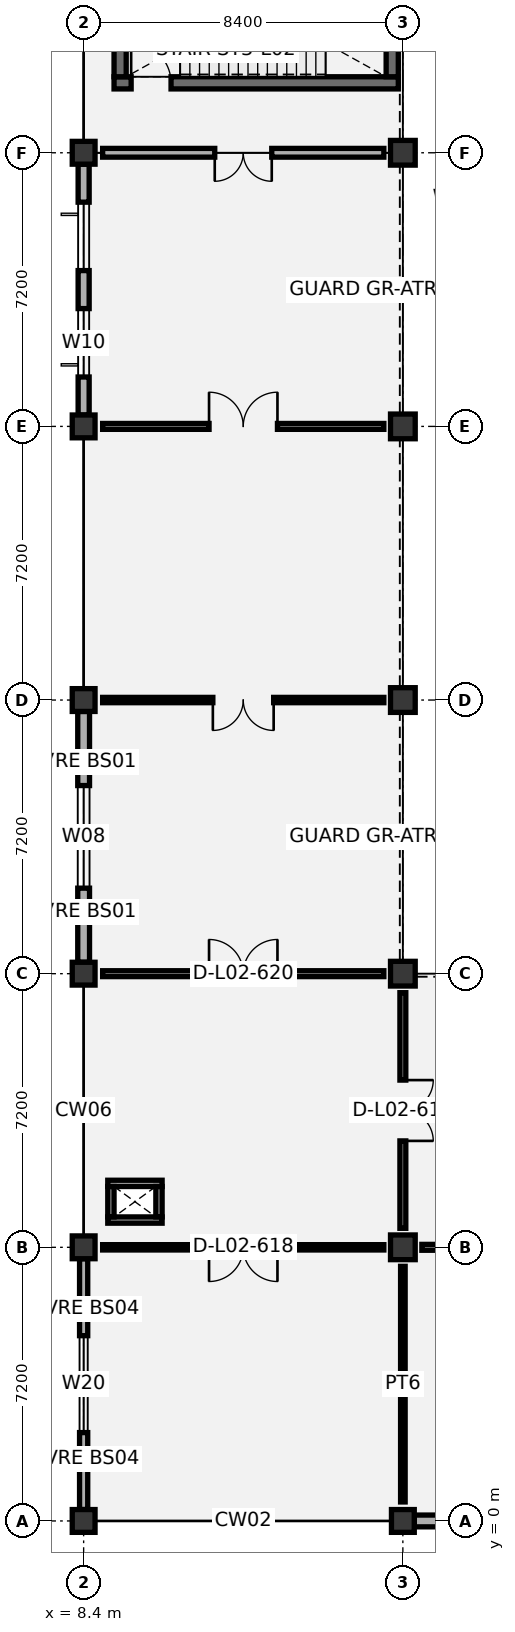
"""IFC4 building model, lengths in metres.
Left out: names, types, materials, properties, quantities, classifications, styles, units other than length and angle.
Written with IfcOpenShell. Run it as: python <this file> out.ifc"""

import sys

from ifc_helpers import new_model, si_unit, direction, frame, frame_2d, origin, origin_2d, place, context, subcontext, project, spatial, rectangle, extrude, element, fill, save


model = new_model("IFC4")
c1 = context("Model", 3, precision=1e-05, world=origin(), true_north=direction((0.0, 1.0)))
c2 = subcontext(c1, "Body", "Model", "MODEL_VIEW")
j1 = project(units=[si_unit("LENGTHUNIT", "METRE"), si_unit("PLANEANGLEUNIT", "RADIAN")], contexts=[c1])
p1 = place(None, origin())
s1 = spatial("IfcSite", under=j1, at=p1, CompositionType="ELEMENT")
p2 = place(p1, origin())
s2 = spatial("IfcBuilding", under=s1, at=p2, CompositionType="ELEMENT")
p3 = place(p2, frame((0.0, 0.0, 11.4)))
s3 = spatial("IfcBuildingStorey", under=s2, at=p3, CompositionType="ELEMENT", Elevation=11.4)
for number, where, z_axis, x_axis in (
    (1, (8.4, 0.0, 0.0), (0.0, 0.0, 1.0), (1.0, 0.0, 0.0)),
    (2, (8.4, 7.2, 0.0), (0.0, 0.0, 1.0), (1.0, 0.0, 0.0)),
    (3, (8.4, 14.4, 0.0), (0.0, 0.0, 1.0), (1.0, 0.0, 0.0)),
    (4, (8.4, 21.6, 0.0), (0.0, 0.0, 1.0), (1.0, 0.0, 0.0)),
    (5, (8.4, 28.8, 0.0), (0.0, 0.0, 1.0), (1.0, 0.0, 0.0)),
    (6, (8.4, 36.0, 0.0), (0.0, 0.0, 1.0), (1.0, 0.0, 0.0)),
    (7, (16.8, 0.0, 0.0), (0.0, 0.0, 1.0), (1.0, 0.0, 0.0)),
):
    element("IfcColumn", number, at=place(p3, frame(where, z_axis=z_axis, x_axis=x_axis)), inside=s3, PredefinedType="COLUMN", context=c2, shape_type="SweptSolid", body=[
        extrude(rectangle(XDim=0.6, YDim=0.6, at=origin_2d()), origin(), (0.0, 0.0, 1.0), 5.4),
    ])
for number, where, z_axis, x_axis in (
    (8, (16.8, 7.2, 0.0), (0.0, 0.0, 1.0), (1.0, 0.0, 0.0)),
    (9, (16.8, 14.4, 0.0), (0.0, 0.0, 1.0), (1.0, 0.0, 0.0)),
    (10, (16.8, 21.6, 0.0), (0.0, 0.0, 1.0), (1.0, 0.0, 0.0)),
    (11, (16.8, 28.8, 0.0), (0.0, 0.0, 1.0), (1.0, 0.0, 0.0)),
    (12, (16.8, 36.0, 0.0), (0.0, 0.0, 1.0), (1.0, 0.0, 0.0)),
):
    element("IfcColumn", number, at=place(p3, frame(where, z_axis=z_axis, x_axis=x_axis)), inside=s3, PredefinedType="COLUMN", context=c2, shape_type="SweptSolid", body=[
        extrude(rectangle(XDim=0.65, YDim=0.65, at=origin_2d()), origin(), (0.0, 0.0, 1.0), 5.4),
    ])
p4 = place(p3, frame((9.2, 37.84, 0.0), z_axis=(0.0, 0.0, 1.0), x_axis=(1.0, 0.0, 0.0)))
e13 = element("IfcWall", 13, at=p4, inside=s3, PredefinedType="SHEAR", context=c2, shape_type="SweptSolid", body=[
    extrude(rectangle(XDim=7.48, YDim=0.32, at=frame_2d((3.74, 0.0))), origin(), (0.0, 0.0, 1.0), 5.1),
])
p5 = place(p4, frame((0.45, 0.0, 0.0)))
e14 = element("IfcOpeningElement", 14, at=p5, cuts=e13, PredefinedType="OPENING", context=c2, shape_type="SweptSolid", body=[
    extrude(rectangle(XDim=1.05, YDim=2.15, at=frame_2d((0.525, 1.075))), frame((0.0, 0.17, 0.0), z_axis=(0.0, -1.0, 0.0), x_axis=(1.0, 0.0, 0.0)), (0.0, 0.0, 1.0), 0.34),
])
for number, where, z_axis, x_axis in (
    (15, (9.36, 38.0, 0.0), (0.0, 0.0, 1.0), (0.0, 1.0, 0.0)),
    (16, (16.52, 38.0, 0.0), (0.0, 0.0, 1.0), (0.0, 1.0, 0.0)),
):
    element("IfcWall", number, at=place(p3, frame(where, z_axis=z_axis, x_axis=x_axis)), inside=s3, PredefinedType="SHEAR", context=c2, shape_type="SweptSolid", body=[
        extrude(rectangle(XDim=3.8, YDim=0.32, at=frame_2d((1.9, 0.0))), origin(), (0.0, 0.0, 1.0), 5.1),
    ])
p6 = place(p3, frame((8.4, 0.3, 0.0), z_axis=(0.0, 0.0, 1.0), x_axis=(0.0, 1.0, 0.0)))
e17 = element("IfcWall", 17, at=p6, inside=s3, PredefinedType="SOLIDWALL", context=c2, shape_type="SweptSolid", body=[
    extrude(rectangle(XDim=6.6, YDim=0.215, at=frame_2d((3.3, 0.0))), origin(), (0.0, 0.0, 1.0), 4.52),
])
p7 = place(p6, frame((2.025, 0.0, 0.9)))
e18 = element("IfcOpeningElement", 18, at=p7, cuts=e17, PredefinedType="OPENING", context=c2, shape_type="SweptSolid", body=[
    extrude(rectangle(XDim=2.55, YDim=1.95, at=frame_2d((1.275, 0.975))), frame((0.0, 0.117, 0.0), z_axis=(0.0, -1.0, 0.0), x_axis=(1.0, 0.0, 0.0)), (0.0, 0.0, 1.0), 0.235),
])
p8 = place(p3, frame((8.4, 14.7, 0.0), z_axis=(0.0, 0.0, 1.0), x_axis=(0.0, 1.0, 0.0)))
e19 = element("IfcWall", 19, at=p8, inside=s3, PredefinedType="SOLIDWALL", context=c2, shape_type="SweptSolid", body=[
    extrude(rectangle(XDim=6.6, YDim=0.31, at=frame_2d((3.3, 0.0))), origin(), (0.0, 0.0, 1.0), 4.445),
])
p9 = place(p8, frame((1.95, 0.0, 0.9)))
e20 = element("IfcOpeningElement", 20, at=p9, cuts=e19, PredefinedType="OPENING", context=c2, shape_type="SweptSolid", body=[
    extrude(rectangle(XDim=2.7, YDim=2.1, at=frame_2d((1.35, 1.05))), frame((0.0, 0.165, 0.0), z_axis=(0.0, -1.0, 0.0), x_axis=(1.0, 0.0, 0.0)), (0.0, 0.0, 1.0), 0.33),
])
p10 = place(p3, frame((8.4, 29.1, 0.0), z_axis=(0.0, 0.0, 1.0), x_axis=(0.0, 1.0, 0.0)))
e21 = element("IfcWall", 21, at=p10, inside=s3, PredefinedType="SOLIDWALL", context=c2, shape_type="SweptSolid", body=[
    extrude(rectangle(XDim=6.6, YDim=0.29, at=frame_2d((3.3, 0.0))), origin(), (0.0, 0.0, 1.0), 4.445),
])
p11 = place(p10, frame((1.0, 0.0, 0.9)))
e22 = element("IfcOpeningElement", 22, at=p11, cuts=e21, PredefinedType="OPENING", context=c2, shape_type="SweptSolid", body=[
    extrude(rectangle(XDim=1.8, YDim=2.1, at=frame_2d((0.9, 1.05))), frame((0.0, 0.155, 0.0), z_axis=(0.0, -1.0, 0.0), x_axis=(1.0, 0.0, 0.0)), (0.0, 0.0, 1.0), 0.31),
])
p12 = place(p10, frame((3.8, 0.0, 0.9)))
e23 = element("IfcOpeningElement", 23, at=p12, cuts=e21, PredefinedType="OPENING", context=c2, shape_type="SweptSolid", body=[
    extrude(rectangle(XDim=1.8, YDim=2.1, at=frame_2d((0.9, 1.05))), frame((0.0, 0.155, 0.0), z_axis=(0.0, -1.0, 0.0), x_axis=(1.0, 0.0, 0.0)), (0.0, 0.0, 1.0), 0.31),
])
p13 = place(p3, frame((17.1, 0.0, 0.0), z_axis=(0.0, 0.0, 1.0), x_axis=(1.0, 0.0, 0.0)))
e24 = element("IfcWall", 24, at=p13, inside=s3, PredefinedType="SOLIDWALL", context=c2, shape_type="SweptSolid", body=[
    extrude(rectangle(XDim=7.8, YDim=0.31, at=frame_2d((3.9, 0.0))), origin(), (0.0, 0.0, 1.0), 4.52),
])
p14 = place(p13, frame((1.0, 0.0, 0.9)))
e25 = element("IfcOpeningElement", 25, at=p14, cuts=e24, PredefinedType="OPENING", context=c2, shape_type="SweptSolid", body=[
    extrude(rectangle(XDim=2.4, YDim=2.1, at=frame_2d((1.2, 1.05))), frame((0.0, 0.165, 0.0), z_axis=(0.0, -1.0, 0.0), x_axis=(1.0, 0.0, 0.0)), (0.0, 0.0, 1.0), 0.33),
])
p15 = place(p13, frame((4.4, 0.0, 0.9)))
e26 = element("IfcOpeningElement", 26, at=p15, cuts=e24, PredefinedType="OPENING", context=c2, shape_type="SweptSolid", body=[
    extrude(rectangle(XDim=2.4, YDim=2.1, at=frame_2d((1.2, 1.05))), frame((0.0, 0.165, 0.0), z_axis=(0.0, -1.0, 0.0), x_axis=(1.0, 0.0, 0.0)), (0.0, 0.0, 1.0), 0.33),
])
p16 = place(p3, frame((0.12, 14.4, 0.0), z_axis=(0.0, 0.0, 1.0), x_axis=(1.0, 0.0, 0.0)))
e27 = element("IfcWall", 27, at=p16, inside=s3, PredefinedType="PARAPET", context=c2, shape_type="SweptSolid", body=[
    extrude(rectangle(XDim=8.16, YDim=0.22, at=frame_2d((4.08, 0.0))), origin(), (0.0, 0.0, 1.0), 1.15),
])
for number, where, z_axis, x_axis in (
    (28, (9.035, 7.917, 0.0), (0.0, 0.0, 1.0), (1.0, 0.0, 0.0)),
    (29, (9.035, 8.883, 0.0), (0.0, 0.0, 1.0), (1.0, 0.0, 0.0)),
):
    element("IfcWall", number, at=place(p3, frame(where, z_axis=z_axis, x_axis=x_axis)), inside=s3, PredefinedType="PARTITIONING", context=c2, shape_type="SweptSolid", body=[
        extrude(rectangle(XDim=1.43, YDim=0.165, at=frame_2d((0.715, 0.0))), origin(), (0.0, 0.0, 1.0), 5.1),
    ])
for number, where, z_axis, x_axis in (
    (30, (9.117, 8.0, 0.0), (0.0, 0.0, 1.0), (0.0, 1.0, 0.0)),
    (31, (10.383, 8.0, 0.0), (0.0, 0.0, 1.0), (0.0, 1.0, 0.0)),
):
    element("IfcWall", number, at=place(p3, frame(where, z_axis=z_axis, x_axis=x_axis)), inside=s3, PredefinedType="PARTITIONING", context=c2, shape_type="SweptSolid", body=[
        extrude(rectangle(XDim=0.8, YDim=0.165, at=frame_2d((0.4, 0.0))), origin(), (0.0, 0.0, 1.0), 5.1),
    ])
p17 = place(p3, frame((16.8, 0.5, 0.0), z_axis=(0.0, 0.0, 1.0), x_axis=(0.0, 1.0, 0.0)))
e32 = element("IfcWall", 32, at=p17, inside=s3, PredefinedType="PARTITIONING", context=c2, shape_type="SweptSolid", body=[
    extrude(rectangle(XDim=6.2, YDim=0.12, at=frame_2d((3.1, 0.0))), origin(), (0.0, 0.0, 1.0), 4.67),
])
p18 = place(p3, frame((8.9, 7.2, 0.0), z_axis=(0.0, 0.0, 1.0), x_axis=(1.0, 0.0, 0.0)))
e33 = element("IfcWall", 33, at=p18, inside=s3, PredefinedType="PARTITIONING", context=c2, shape_type="SweptSolid", body=[
    extrude(rectangle(XDim=7.4, YDim=0.14, at=frame_2d((3.7, 0.0))), origin(), (0.0, 0.0, 1.0), 4.345),
])
p19 = place(p18, frame((2.8, 0.0, 0.0)))
e34 = element("IfcOpeningElement", 34, at=p19, cuts=e33, PredefinedType="OPENING", context=c2, shape_type="SweptSolid", body=[
    extrude(rectangle(XDim=1.8, YDim=2.25, at=frame_2d((0.9, 1.125))), frame((0.0, 0.08, 0.0), z_axis=(0.0, -1.0, 0.0), x_axis=(1.0, 0.0, 0.0)), (0.0, 0.0, 1.0), 0.16),
])
p20 = place(p3, frame((16.8, 7.7, 0.0), z_axis=(0.0, 0.0, 1.0), x_axis=(0.0, 1.0, 0.0)))
e35 = element("IfcWall", 35, at=p20, inside=s3, PredefinedType="PARTITIONING", context=c2, shape_type="SweptSolid", body=[
    extrude(rectangle(XDim=6.2, YDim=0.155, at=frame_2d((3.1, 0.0))), origin(), (0.0, 0.0, 1.0), 4.395),
])
p21 = place(p20, frame((2.3, 0.0, 0.0)))
e36 = element("IfcOpeningElement", 36, at=p21, cuts=e35, PredefinedType="OPENING", context=c2, shape_type="SweptSolid", body=[
    extrude(rectangle(XDim=1.6, YDim=2.2, at=frame_2d((0.8, 1.1))), frame((0.0, 0.087, 0.0), z_axis=(0.0, -1.0, 0.0), x_axis=(1.0, 0.0, 0.0)), (0.0, 0.0, 1.0), 0.175),
])
p22 = place(p3, frame((8.9, 14.4, 0.0), z_axis=(0.0, 0.0, 1.0), x_axis=(1.0, 0.0, 0.0)))
e37 = element("IfcWall", 37, at=p22, inside=s3, PredefinedType="PARTITIONING", context=c2, shape_type="SweptSolid", body=[
    extrude(rectangle(XDim=7.4, YDim=0.155, at=frame_2d((3.7, 0.0))), origin(), (0.0, 0.0, 1.0), 4.345),
])
p23 = place(p22, frame((2.8, 0.0, 0.0)))
e38 = element("IfcOpeningElement", 38, at=p23, cuts=e37, PredefinedType="OPENING", context=c2, shape_type="SweptSolid", body=[
    extrude(rectangle(XDim=1.8, YDim=2.25, at=frame_2d((0.9, 1.125))), frame((0.0, 0.087, 0.0), z_axis=(0.0, -1.0, 0.0), x_axis=(1.0, 0.0, 0.0)), (0.0, 0.0, 1.0), 0.175),
])
p24 = place(p3, frame((8.9, 21.6, 0.0), z_axis=(0.0, 0.0, 1.0), x_axis=(1.0, 0.0, 0.0)))
e39 = element("IfcWall", 39, at=p24, inside=s3, PredefinedType="PARTITIONING", context=c2, shape_type="SweptSolid", body=[
    extrude(rectangle(XDim=7.4, YDim=0.14, at=frame_2d((3.7, 0.0))), origin(), (0.0, 0.0, 1.0), 4.345),
])
p25 = place(p24, frame((2.9, 0.0, 0.0)))
e40 = element("IfcOpeningElement", 40, at=p25, cuts=e39, PredefinedType="OPENING", context=c2, shape_type="SweptSolid", body=[
    extrude(rectangle(XDim=1.6, YDim=2.2, at=frame_2d((0.8, 1.1))), frame((0.0, 0.08, 0.0), z_axis=(0.0, -1.0, 0.0), x_axis=(1.0, 0.0, 0.0)), (0.0, 0.0, 1.0), 0.16),
])
p26 = place(p3, frame((8.9, 28.8, 0.0), z_axis=(0.0, 0.0, 1.0), x_axis=(1.0, 0.0, 0.0)))
e41 = element("IfcWall", 41, at=p26, inside=s3, PredefinedType="PARTITIONING", context=c2, shape_type="SweptSolid", body=[
    extrude(rectangle(XDim=7.4, YDim=0.155, at=frame_2d((3.7, 0.0))), origin(), (0.0, 0.0, 1.0), 4.345),
])
p27 = place(p26, frame((2.8, 0.0, 0.0)))
e42 = element("IfcOpeningElement", 42, at=p27, cuts=e41, PredefinedType="OPENING", context=c2, shape_type="SweptSolid", body=[
    extrude(rectangle(XDim=1.8, YDim=2.25, at=frame_2d((0.9, 1.125))), frame((0.0, 0.087, 0.0), z_axis=(0.0, -1.0, 0.0), x_axis=(1.0, 0.0, 0.0)), (0.0, 0.0, 1.0), 0.175),
])
p28 = place(p3, frame((8.9, 36.0, 0.0), z_axis=(0.0, 0.0, 1.0), x_axis=(1.0, 0.0, 0.0)))
e43 = element("IfcWall", 43, at=p28, inside=s3, PredefinedType="PARTITIONING", context=c2, shape_type="SweptSolid", body=[
    extrude(rectangle(XDim=7.4, YDim=0.23, at=frame_2d((3.7, 0.0))), origin(), (0.0, 0.0, 1.0), 4.345),
])
p29 = place(p28, frame((2.95, 0.0, 0.0)))
e44 = element("IfcOpeningElement", 44, at=p29, cuts=e43, PredefinedType="OPENING", context=c2, shape_type="SweptSolid", body=[
    extrude(rectangle(XDim=1.5, YDim=2.15, at=frame_2d((0.75, 1.075))), frame((0.0, 0.125, 0.0), z_axis=(0.0, -1.0, 0.0), x_axis=(1.0, 0.0, 0.0)), (0.0, 0.0, 1.0), 0.25),
])
p30 = place(p3, frame((17.3, 7.2, 0.0), z_axis=(0.0, 0.0, 1.0), x_axis=(1.0, 0.0, 0.0)))
e45 = element("IfcWall", 45, at=p30, inside=s3, PredefinedType="PARTITIONING", context=c2, shape_type="SweptSolid", body=[
    extrude(rectangle(XDim=7.4, YDim=0.155, at=frame_2d((3.7, 0.0))), origin(), (0.0, 0.0, 1.0), 4.345),
])
p31 = place(p30, frame((2.8, 0.0, 0.0)))
e46 = element("IfcOpeningElement", 46, at=p31, cuts=e45, PredefinedType="OPENING", context=c2, shape_type="SweptSolid", body=[
    extrude(rectangle(XDim=1.8, YDim=2.25, at=frame_2d((0.9, 1.125))), frame((0.0, 0.087, 0.0), z_axis=(0.0, -1.0, 0.0), x_axis=(1.0, 0.0, 0.0)), (0.0, 0.0, 1.0), 0.175),
])
p32 = place(p7, origin())
e47 = element("IfcWindow", 47, at=p32, inside=s3, PartitioningType="SINGLE_PANEL", PredefinedType="WINDOW", context=c2, shape_type="SweptSolid", body=[
    extrude(rectangle(XDim=2.55, YDim=1.95, at=frame_2d((1.275, 0.975))), frame((0.0, 0.03, 0.0), z_axis=(0.0, -1.0, 0.0), x_axis=(1.0, 0.0, 0.0)), (0.0, 0.0, 1.0), 0.06),
])
fill(e18, e47)
p33 = place(p9, origin())
e48 = element("IfcWindow", 48, at=p33, inside=s3, PartitioningType="SINGLE_PANEL", PredefinedType="WINDOW", context=c2, shape_type="SweptSolid", body=[
    extrude(rectangle(XDim=2.7, YDim=2.1, at=frame_2d((1.35, 1.05))), frame((0.0, 0.03, 0.0), z_axis=(0.0, -1.0, 0.0), x_axis=(1.0, 0.0, 0.0)), (0.0, 0.0, 1.0), 0.06),
])
fill(e20, e48)
p34 = place(p11, origin())
e49 = element("IfcWindow", 49, at=p34, inside=s3, PartitioningType="SINGLE_PANEL", PredefinedType="WINDOW", context=c2, shape_type="SweptSolid", body=[
    extrude(rectangle(XDim=1.8, YDim=2.1, at=frame_2d((0.9, 1.05))), frame((0.0, 0.03, 0.0), z_axis=(0.0, -1.0, 0.0), x_axis=(1.0, 0.0, 0.0)), (0.0, 0.0, 1.0), 0.06),
])
fill(e22, e49)
p35 = place(p12, origin())
e50 = element("IfcWindow", 50, at=p35, inside=s3, PartitioningType="SINGLE_PANEL", PredefinedType="WINDOW", context=c2, shape_type="SweptSolid", body=[
    extrude(rectangle(XDim=1.8, YDim=2.1, at=frame_2d((0.9, 1.05))), frame((0.0, 0.03, 0.0), z_axis=(0.0, -1.0, 0.0), x_axis=(1.0, 0.0, 0.0)), (0.0, 0.0, 1.0), 0.06),
])
fill(e23, e50)
p36 = place(p5, origin())
e51 = element("IfcDoor", 51, at=p36, inside=s3, OperationType="SINGLE_SWING_LEFT", PredefinedType="DOOR", context=c2, shape_type="SweptSolid", body=[
    extrude(rectangle(XDim=1.05, YDim=2.15, at=frame_2d((0.525, 1.075))), frame((0.0, 0.025, 0.0), z_axis=(0.0, -1.0, 0.0), x_axis=(1.0, 0.0, 0.0)), (0.0, 0.0, 1.0), 0.05),
])
fill(e14, e51)
p37 = place(p19, frame((1.8, 0.0, 0.0), z_axis=(0.0, 0.0, 1.0), x_axis=(-1.0, 0.0, 0.0)))
e52 = element("IfcDoor", 52, at=p37, inside=s3, OperationType="DOUBLE_DOOR_SINGLE_SWING", PredefinedType="DOOR", context=c2, shape_type="SweptSolid", body=[
    extrude(rectangle(XDim=1.8, YDim=2.25, at=frame_2d((0.9, 1.125))), frame((0.0, 0.025, 0.0), z_axis=(0.0, -1.0, 0.0), x_axis=(1.0, 0.0, 0.0)), (0.0, 0.0, 1.0), 0.05),
])
fill(e34, e52)
p38 = place(p21, frame((1.6, 0.0, 0.0), z_axis=(0.0, 0.0, 1.0), x_axis=(-1.0, 0.0, 0.0)))
e53 = element("IfcDoor", 53, at=p38, inside=s3, OperationType="DOUBLE_DOOR_SINGLE_SWING", PredefinedType="DOOR", context=c2, shape_type="SweptSolid", body=[
    extrude(rectangle(XDim=1.6, YDim=2.2, at=frame_2d((0.8, 1.1))), frame((0.0, 0.025, 0.0), z_axis=(0.0, -1.0, 0.0), x_axis=(1.0, 0.0, 0.0)), (0.0, 0.0, 1.0), 0.05),
])
fill(e36, e53)
p39 = place(p23, origin())
e54 = element("IfcDoor", 54, at=p39, inside=s3, OperationType="DOUBLE_DOOR_SINGLE_SWING", PredefinedType="DOOR", context=c2, shape_type="SweptSolid", body=[
    extrude(rectangle(XDim=1.8, YDim=2.25, at=frame_2d((0.9, 1.125))), frame((0.0, 0.025, 0.0), z_axis=(0.0, -1.0, 0.0), x_axis=(1.0, 0.0, 0.0)), (0.0, 0.0, 1.0), 0.05),
])
fill(e38, e54)
p40 = place(p25, frame((1.6, 0.0, 0.0), z_axis=(0.0, 0.0, 1.0), x_axis=(-1.0, 0.0, 0.0)))
e55 = element("IfcDoor", 55, at=p40, inside=s3, OperationType="DOUBLE_DOOR_SINGLE_SWING", PredefinedType="DOOR", context=c2, shape_type="SweptSolid", body=[
    extrude(rectangle(XDim=1.6, YDim=2.2, at=frame_2d((0.8, 1.1))), frame((0.0, 0.025, 0.0), z_axis=(0.0, -1.0, 0.0), x_axis=(1.0, 0.0, 0.0)), (0.0, 0.0, 1.0), 0.05),
])
fill(e40, e55)
p41 = place(p27, origin())
e56 = element("IfcDoor", 56, at=p41, inside=s3, OperationType="DOUBLE_DOOR_SINGLE_SWING", PredefinedType="DOOR", context=c2, shape_type="SweptSolid", body=[
    extrude(rectangle(XDim=1.8, YDim=2.25, at=frame_2d((0.9, 1.125))), frame((0.0, 0.025, 0.0), z_axis=(0.0, -1.0, 0.0), x_axis=(1.0, 0.0, 0.0)), (0.0, 0.0, 1.0), 0.05),
])
fill(e42, e56)
p42 = place(p29, frame((1.5, 0.0, 0.0), z_axis=(0.0, 0.0, 1.0), x_axis=(-1.0, 0.0, 0.0)))
e57 = element("IfcDoor", 57, at=p42, inside=s3, OperationType="DOUBLE_DOOR_SINGLE_SWING", PredefinedType="DOOR", context=c2, shape_type="SweptSolid", body=[
    extrude(rectangle(XDim=1.5, YDim=2.15, at=frame_2d((0.75, 1.075))), frame((0.0, 0.025, 0.0), z_axis=(0.0, -1.0, 0.0), x_axis=(1.0, 0.0, 0.0)), (0.0, 0.0, 1.0), 0.05),
])
fill(e44, e57)
save(model, sys.argv[1])
